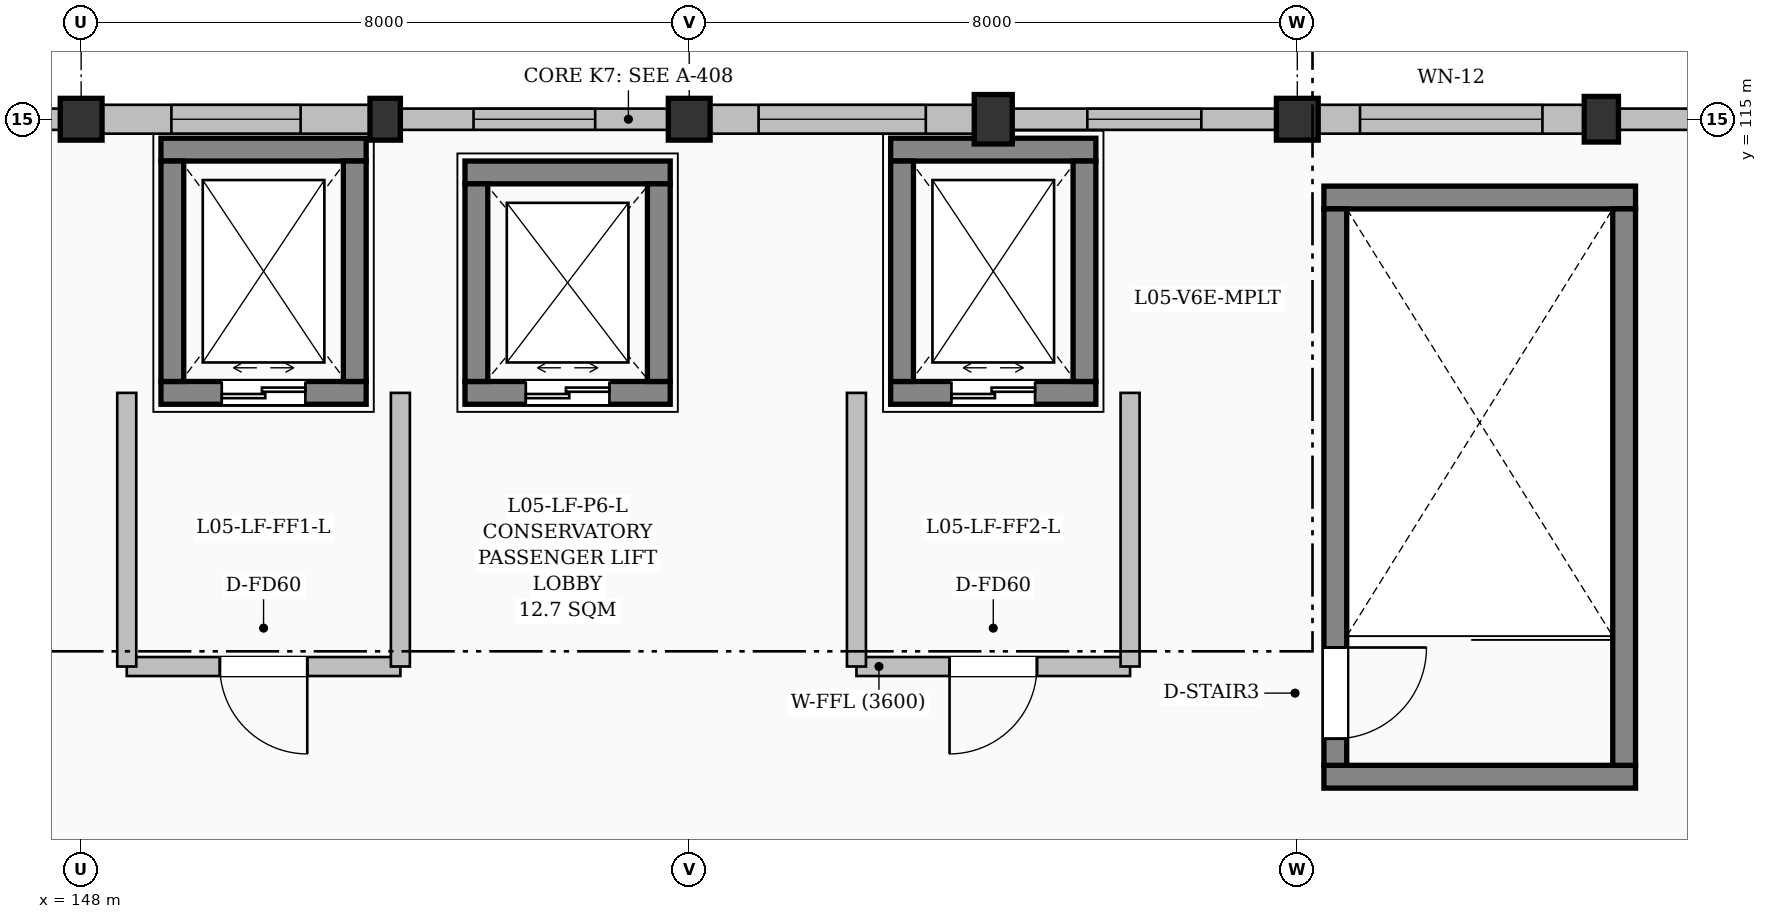
"""IFC4 building model, lengths in metres.
Left out: names, types, materials, properties, quantities, classifications, styles, units other than length and angle.
Written with IfcOpenShell. Run it as: python <this file> out.ifc"""

import sys

from ifc_helpers import new_model, si_unit, direction, frame, frame_2d, origin, origin_2d, place, context, subcontext, project, spatial, rectangle, extrude, element, fill, save


model = new_model("IFC4")
c1 = context("Model", 3, precision=1e-05, world=origin(), true_north=direction((0.0, 1.0)))
c2 = subcontext(c1, "Body", "Model", "MODEL_VIEW")
j1 = project(units=[si_unit("LENGTHUNIT", "METRE"), si_unit("PLANEANGLEUNIT", "RADIAN")], contexts=[c1])
p1 = place(None, origin())
s1 = spatial("IfcSite", under=j1, at=p1, CompositionType="ELEMENT")
p2 = place(p1, origin())
s2 = spatial("IfcBuilding", under=s1, at=p2, CompositionType="ELEMENT")
p3 = place(p2, frame((0.0, 0.0, 22.8)))
s3 = spatial("IfcBuildingStorey", under=s2, at=p3, CompositionType="ELEMENT", Elevation=22.8)
p4 = place(p3, frame((148.0, 115.0, 0.0), z_axis=(0.0, 0.0, 1.0), x_axis=(1.0, 0.0, 0.0)))
e1 = element("IfcColumn", 1, at=p4, inside=s3, PredefinedType="COLUMN", context=c2, shape_type="SweptSolid", body=[
    extrude(rectangle(XDim=0.55, YDim=0.55, at=origin_2d()), origin(), (0.0, 0.0, 1.0), 4.5),
])
p5 = place(p3, frame((152.0, 115.0, 0.0), z_axis=(0.0, 0.0, 1.0), x_axis=(1.0, 0.0, 0.0)))
e2 = element("IfcColumn", 2, at=p5, inside=s3, PredefinedType="PILASTER", context=c2, shape_type="SweptSolid", body=[
    extrude(rectangle(XDim=0.4, YDim=0.55, at=origin_2d()), origin(), (0.0, 0.0, 1.0), 4.5),
])
p6 = place(p3, frame((156.0, 115.0, 0.0), z_axis=(0.0, 0.0, 1.0), x_axis=(1.0, 0.0, 0.0)))
e3 = element("IfcColumn", 3, at=p6, inside=s3, PredefinedType="COLUMN", context=c2, shape_type="SweptSolid", body=[
    extrude(rectangle(XDim=0.55, YDim=0.55, at=origin_2d()), origin(), (0.0, 0.0, 1.0), 4.5),
])
p7 = place(p3, frame((160.0, 115.0, 0.0), z_axis=(0.0, 0.0, 1.0), x_axis=(1.0, 0.0, 0.0)))
e4 = element("IfcColumn", 4, at=p7, inside=s3, PredefinedType="PILASTER", context=c2, shape_type="SweptSolid", body=[
    extrude(rectangle(XDim=0.5, YDim=0.65, at=origin_2d()), origin(), (0.0, 0.0, 1.0), 4.5),
])
p8 = place(p3, frame((164.0, 115.0, 0.0), z_axis=(0.0, 0.0, 1.0), x_axis=(1.0, 0.0, 0.0)))
e5 = element("IfcColumn", 5, at=p8, inside=s3, PredefinedType="COLUMN", context=c2, shape_type="SweptSolid", body=[
    extrude(rectangle(XDim=0.55, YDim=0.55, at=origin_2d()), origin(), (0.0, 0.0, 1.0), 4.5),
])
p9 = place(p3, frame((168.0, 115.0, 0.0), z_axis=(0.0, 0.0, 1.0), x_axis=(1.0, 0.0, 0.0)))
e6 = element("IfcColumn", 6, at=p9, inside=s3, PredefinedType="PILASTER", context=c2, shape_type="SweptSolid", body=[
    extrude(rectangle(XDim=0.45, YDim=0.6, at=origin_2d()), origin(), (0.0, 0.0, 1.0), 4.5),
])
p10 = place(p3, frame((144.225, 115.0, 0.0), z_axis=(0.0, 0.0, 1.0), x_axis=(1.0, 0.0, 0.0)))
e7 = element("IfcWall", 7, at=p10, inside=s3, PredefinedType="SOLIDWALL", context=c2, shape_type="SweptSolid", body=[
    extrude(rectangle(XDim=3.5, YDim=0.28, at=frame_2d((1.75, 0.0))), origin(), (0.0, 0.0, 1.0), 4.125),
])
p11 = place(p10, frame((0.55, 0.0, 0.95)))
e8 = element("IfcOpeningElement", 8, at=p11, cuts=e7, PredefinedType="OPENING", context=c2, shape_type="SweptSolid", body=[
    extrude(rectangle(XDim=2.4, YDim=1.2, at=frame_2d((1.2, 0.6))), frame((0.0, 0.15, 0.0), z_axis=(0.0, -1.0, 0.0), x_axis=(1.0, 0.0, 0.0)), (0.0, 0.0, 1.0), 0.3),
])
p12 = place(p3, frame((148.275, 115.0, 0.0), z_axis=(0.0, 0.0, 1.0), x_axis=(1.0, 0.0, 0.0)))
e9 = element("IfcWall", 9, at=p12, inside=s3, PredefinedType="SOLIDWALL", context=c2, shape_type="SweptSolid", body=[
    extrude(rectangle(XDim=3.525, YDim=0.38, at=frame_2d((1.763, 0.0))), origin(), (0.0, 0.0, 1.0), 4.125),
])
p13 = place(p12, frame((0.913, 0.0, 0.95)))
e10 = element("IfcOpeningElement", 10, at=p13, cuts=e9, PredefinedType="OPENING", context=c2, shape_type="SweptSolid", body=[
    extrude(rectangle(XDim=1.7, YDim=2.0, at=frame_2d((0.85, 1.0))), frame((0.0, 0.2, 0.0), z_axis=(0.0, -1.0, 0.0), x_axis=(1.0, 0.0, 0.0)), (0.0, 0.0, 1.0), 0.4),
])
p14 = place(p3, frame((152.2, 115.0, 0.0), z_axis=(0.0, 0.0, 1.0), x_axis=(1.0, 0.0, 0.0)))
e11 = element("IfcWall", 11, at=p14, inside=s3, PredefinedType="SOLIDWALL", context=c2, shape_type="SweptSolid", body=[
    extrude(rectangle(XDim=3.525, YDim=0.28, at=frame_2d((1.763, 0.0))), origin(), (0.0, 0.0, 1.0), 4.125),
])
p15 = place(p14, frame((0.962, 0.0, 0.95)))
e12 = element("IfcOpeningElement", 12, at=p15, cuts=e11, PredefinedType="OPENING", context=c2, shape_type="SweptSolid", body=[
    extrude(rectangle(XDim=1.6, YDim=1.8, at=frame_2d((0.8, 0.9))), frame((0.0, 0.15, 0.0), z_axis=(0.0, -1.0, 0.0), x_axis=(1.0, 0.0, 0.0)), (0.0, 0.0, 1.0), 0.3),
])
p16 = place(p3, frame((156.275, 115.0, 0.0), z_axis=(0.0, 0.0, 1.0), x_axis=(1.0, 0.0, 0.0)))
e13 = element("IfcWall", 13, at=p16, inside=s3, PredefinedType="SOLIDWALL", context=c2, shape_type="SweptSolid", body=[
    extrude(rectangle(XDim=3.475, YDim=0.38, at=frame_2d((1.738, 0.0))), origin(), (0.0, 0.0, 1.0), 4.125),
])
p17 = place(p16, frame((0.637, 0.0, 0.95)))
e14 = element("IfcOpeningElement", 14, at=p17, cuts=e13, PredefinedType="OPENING", context=c2, shape_type="SweptSolid", body=[
    extrude(rectangle(XDim=2.2, YDim=1.8, at=frame_2d((1.1, 0.9))), frame((0.0, 0.2, 0.0), z_axis=(0.0, -1.0, 0.0), x_axis=(1.0, 0.0, 0.0)), (0.0, 0.0, 1.0), 0.4),
])
p18 = place(p3, frame((160.25, 115.0, 0.0), z_axis=(0.0, 0.0, 1.0), x_axis=(1.0, 0.0, 0.0)))
e15 = element("IfcWall", 15, at=p18, inside=s3, PredefinedType="SOLIDWALL", context=c2, shape_type="SweptSolid", body=[
    extrude(rectangle(XDim=3.475, YDim=0.28, at=frame_2d((1.738, 0.0))), origin(), (0.0, 0.0, 1.0), 4.125),
])
p19 = place(p18, frame((0.988, 0.0, 0.95)))
e16 = element("IfcOpeningElement", 16, at=p19, cuts=e15, PredefinedType="OPENING", context=c2, shape_type="SweptSolid", body=[
    extrude(rectangle(XDim=1.5, YDim=1.5, at=frame_2d((0.75, 0.75))), frame((0.0, 0.15, 0.0), z_axis=(0.0, -1.0, 0.0), x_axis=(1.0, 0.0, 0.0)), (0.0, 0.0, 1.0), 0.3),
])
p20 = place(p3, frame((164.275, 115.0, 0.0), z_axis=(0.0, 0.0, 1.0), x_axis=(1.0, 0.0, 0.0)))
e17 = element("IfcWall", 17, at=p20, inside=s3, PredefinedType="SOLIDWALL", context=c2, shape_type="SweptSolid", body=[
    extrude(rectangle(XDim=3.5, YDim=0.38, at=frame_2d((1.75, 0.0))), origin(), (0.0, 0.0, 1.0), 4.125),
])
p21 = place(p20, frame((0.55, 0.0, 0.95)))
e18 = element("IfcOpeningElement", 18, at=p21, cuts=e17, PredefinedType="OPENING", context=c2, shape_type="SweptSolid", body=[
    extrude(rectangle(XDim=2.4, YDim=1.5, at=frame_2d((1.2, 0.75))), frame((0.0, 0.2, 0.0), z_axis=(0.0, -1.0, 0.0), x_axis=(1.0, 0.0, 0.0)), (0.0, 0.0, 1.0), 0.4),
])
p22 = place(p3, frame((168.225, 115.0, 0.0), z_axis=(0.0, 0.0, 1.0), x_axis=(1.0, 0.0, 0.0)))
e19 = element("IfcWall", 19, at=p22, inside=s3, PredefinedType="SOLIDWALL", context=c2, shape_type="SweptSolid", body=[
    extrude(rectangle(XDim=3.5, YDim=0.28, at=frame_2d((1.75, 0.0))), origin(), (0.0, 0.0, 1.0), 4.125),
])
p23 = place(p22, frame((0.95, 0.0, 0.95)))
e20 = element("IfcOpeningElement", 20, at=p23, cuts=e19, PredefinedType="OPENING", context=c2, shape_type="SweptSolid", body=[
    extrude(rectangle(XDim=1.6, YDim=1.2, at=frame_2d((0.8, 0.6))), frame((0.0, 0.15, 0.0), z_axis=(0.0, -1.0, 0.0), x_axis=(1.0, 0.0, 0.0)), (0.0, 0.0, 1.0), 0.3),
])
for number, where, z_axis, x_axis in (
    (21, (164.35, 106.35, 0.0), (0.0, 0.0, 1.0), (1.0, 0.0, 0.0)),
    (22, (168.45, 113.97, 0.0), (0.0, 0.0, 1.0), (-1.0, 0.0, 0.0)),
):
    element("IfcWall", number, at=place(p3, frame(where, z_axis=z_axis, x_axis=x_axis)), inside=s3, PredefinedType="SHEAR", context=c2, shape_type="SweptSolid", body=[
        extrude(rectangle(XDim=4.1, YDim=0.3, at=frame_2d((2.05, 0.0))), origin(), (0.0, 0.0, 1.0), 4.25),
    ])
p24 = place(p3, frame((164.5, 113.82, 0.0), z_axis=(0.0, 0.0, 1.0), x_axis=(0.0, -1.0, 0.0)))
e23 = element("IfcWall", 23, at=p24, inside=s3, PredefinedType="SHEAR", context=c2, shape_type="SweptSolid", body=[
    extrude(rectangle(XDim=7.32, YDim=0.3, at=frame_2d((3.66, 0.0))), origin(), (0.0, 0.0, 1.0), 4.25),
])
p25 = place(p24, frame((5.77, 0.0, 0.0)))
e24 = element("IfcOpeningElement", 24, at=p25, cuts=e23, PredefinedType="OPENING", context=c2, shape_type="SweptSolid", body=[
    extrude(rectangle(XDim=1.2, YDim=2.15, at=frame_2d((0.6, 1.075))), frame((0.0, 0.16, 0.0), z_axis=(0.0, -1.0, 0.0), x_axis=(1.0, 0.0, 0.0)), (0.0, 0.0, 1.0), 0.32),
])
p26 = place(p3, frame((168.3, 113.82, 0.0), z_axis=(0.0, 0.0, 1.0), x_axis=(0.0, -1.0, 0.0)))
e25 = element("IfcWall", 25, at=p26, inside=s3, PredefinedType="SHEAR", context=c2, shape_type="SweptSolid", body=[
    extrude(rectangle(XDim=7.32, YDim=0.3, at=frame_2d((3.66, 0.0))), origin(), (0.0, 0.0, 1.0), 4.25),
])
p27 = place(p3, frame((149.05, 111.4, 0.0), z_axis=(0.0, 0.0, 1.0), x_axis=(1.0, 0.0, 0.0)))
e26 = element("IfcWall", 26, at=p27, inside=s3, PredefinedType="SHEAR", context=c2, shape_type="SweptSolid", body=[
    extrude(rectangle(XDim=2.7, YDim=0.3, at=frame_2d((1.35, 0.0))), origin(), (0.0, 0.0, 1.0), 4.25),
])
p28 = place(p27, frame((0.8, 0.0, 0.0)))
e27 = element("IfcOpeningElement", 27, at=p28, cuts=e26, PredefinedType="OPENING", context=c2, shape_type="SweptSolid", body=[
    extrude(rectangle(XDim=1.1, YDim=2.15, at=frame_2d((0.55, 1.075))), frame((0.0, 0.16, 0.0), z_axis=(0.0, -1.0, 0.0), x_axis=(1.0, 0.0, 0.0)), (0.0, 0.0, 1.0), 0.32),
])
p29 = place(p3, frame((151.75, 114.6, 0.0), z_axis=(0.0, 0.0, 1.0), x_axis=(-1.0, 0.0, 0.0)))
e28 = element("IfcWall", 28, at=p29, inside=s3, PredefinedType="SHEAR", context=c2, shape_type="SweptSolid", body=[
    extrude(rectangle(XDim=2.7, YDim=0.3, at=frame_2d((1.35, 0.0))), origin(), (0.0, 0.0, 1.0), 4.25),
])
for number, where, z_axis, x_axis in (
    (29, (149.2, 111.55, 0.0), (0.0, 0.0, 1.0), (0.0, 1.0, 0.0)),
    (30, (151.6, 114.45, 0.0), (0.0, 0.0, 1.0), (0.0, -1.0, 0.0)),
):
    element("IfcWall", number, at=place(p3, frame(where, z_axis=z_axis, x_axis=x_axis)), inside=s3, PredefinedType="SHEAR", context=c2, shape_type="SweptSolid", body=[
        extrude(rectangle(XDim=2.9, YDim=0.3, at=frame_2d((1.45, 0.0))), origin(), (0.0, 0.0, 1.0), 4.25),
    ])
p30 = place(p3, frame((152.2, 107.8, 0.0), z_axis=(0.0, 0.0, 1.0), x_axis=(-1.0, 0.0, 0.0)))
e31 = element("IfcWall", 31, at=p30, inside=s3, PredefinedType="SOLIDWALL", context=c2, shape_type="SweptSolid", body=[
    extrude(rectangle(XDim=3.6, YDim=0.25, at=frame_2d((1.8, 0.0))), origin(), (0.0, 0.0, 1.0), 4.25),
])
p31 = place(p30, frame((1.225, 0.0, 0.0)))
e32 = element("IfcOpeningElement", 32, at=p31, cuts=e31, PredefinedType="OPENING", context=c2, shape_type="SweptSolid", body=[
    extrude(rectangle(XDim=1.15, YDim=2.15, at=frame_2d((0.575, 1.075))), frame((0.0, 0.135, 0.0), z_axis=(0.0, -1.0, 0.0), x_axis=(1.0, 0.0, 0.0)), (0.0, 0.0, 1.0), 0.27),
])
for number, where, z_axis, x_axis in (
    (33, (148.6, 107.8, 0.0), (0.0, 0.0, 1.0), (0.0, 1.0, 0.0)),
    (34, (152.2, 111.4, 0.0), (0.0, 0.0, 1.0), (0.0, -1.0, 0.0)),
):
    element("IfcWall", number, at=place(p3, frame(where, z_axis=z_axis, x_axis=x_axis)), inside=s3, PredefinedType="SOLIDWALL", context=c2, shape_type="SweptSolid", body=[
        extrude(rectangle(XDim=3.6, YDim=0.25, at=frame_2d((1.8, 0.0))), origin(), (0.0, 0.0, 1.0), 4.25),
    ])
p32 = place(p3, frame((158.65, 111.4, 0.0), z_axis=(0.0, 0.0, 1.0), x_axis=(1.0, 0.0, 0.0)))
e35 = element("IfcWall", 35, at=p32, inside=s3, PredefinedType="SHEAR", context=c2, shape_type="SweptSolid", body=[
    extrude(rectangle(XDim=2.7, YDim=0.3, at=frame_2d((1.35, 0.0))), origin(), (0.0, 0.0, 1.0), 4.25),
])
p33 = place(p32, frame((0.8, 0.0, 0.0)))
e36 = element("IfcOpeningElement", 36, at=p33, cuts=e35, PredefinedType="OPENING", context=c2, shape_type="SweptSolid", body=[
    extrude(rectangle(XDim=1.1, YDim=2.15, at=frame_2d((0.55, 1.075))), frame((0.0, 0.16, 0.0), z_axis=(0.0, -1.0, 0.0), x_axis=(1.0, 0.0, 0.0)), (0.0, 0.0, 1.0), 0.32),
])
p34 = place(p3, frame((161.35, 114.6, 0.0), z_axis=(0.0, 0.0, 1.0), x_axis=(-1.0, 0.0, 0.0)))
e37 = element("IfcWall", 37, at=p34, inside=s3, PredefinedType="SHEAR", context=c2, shape_type="SweptSolid", body=[
    extrude(rectangle(XDim=2.7, YDim=0.3, at=frame_2d((1.35, 0.0))), origin(), (0.0, 0.0, 1.0), 4.25),
])
for number, where, z_axis, x_axis in (
    (38, (158.8, 111.55, 0.0), (0.0, 0.0, 1.0), (0.0, 1.0, 0.0)),
    (39, (161.2, 114.45, 0.0), (0.0, 0.0, 1.0), (0.0, -1.0, 0.0)),
):
    element("IfcWall", number, at=place(p3, frame(where, z_axis=z_axis, x_axis=x_axis)), inside=s3, PredefinedType="SHEAR", context=c2, shape_type="SweptSolid", body=[
        extrude(rectangle(XDim=2.9, YDim=0.3, at=frame_2d((1.45, 0.0))), origin(), (0.0, 0.0, 1.0), 4.25),
    ])
p35 = place(p3, frame((161.8, 107.8, 0.0), z_axis=(0.0, 0.0, 1.0), x_axis=(-1.0, 0.0, 0.0)))
e40 = element("IfcWall", 40, at=p35, inside=s3, PredefinedType="SOLIDWALL", context=c2, shape_type="SweptSolid", body=[
    extrude(rectangle(XDim=3.6, YDim=0.25, at=frame_2d((1.8, 0.0))), origin(), (0.0, 0.0, 1.0), 4.25),
])
p36 = place(p35, frame((1.225, 0.0, 0.0)))
e41 = element("IfcOpeningElement", 41, at=p36, cuts=e40, PredefinedType="OPENING", context=c2, shape_type="SweptSolid", body=[
    extrude(rectangle(XDim=1.15, YDim=2.15, at=frame_2d((0.575, 1.075))), frame((0.0, 0.135, 0.0), z_axis=(0.0, -1.0, 0.0), x_axis=(1.0, 0.0, 0.0)), (0.0, 0.0, 1.0), 0.27),
])
p37 = place(p3, frame((158.2, 107.8, 0.0), z_axis=(0.0, 0.0, 1.0), x_axis=(0.0, 1.0, 0.0)))
e42 = element("IfcWall", 42, at=p37, inside=s3, PredefinedType="SOLIDWALL", context=c2, shape_type="SweptSolid", body=[
    extrude(rectangle(XDim=3.6, YDim=0.25, at=frame_2d((1.8, 0.0))), origin(), (0.0, 0.0, 1.0), 3.974),
])
p38 = place(p3, frame((161.8, 111.4, 0.0), z_axis=(0.0, 0.0, 1.0), x_axis=(0.0, -1.0, 0.0)))
e43 = element("IfcWall", 43, at=p38, inside=s3, PredefinedType="SOLIDWALL", context=c2, shape_type="SweptSolid", body=[
    extrude(rectangle(XDim=3.6, YDim=0.25, at=frame_2d((1.8, 0.0))), origin(), (0.0, 0.0, 1.0), 4.25),
])
p39 = place(p3, frame((153.05, 111.4, 0.0), z_axis=(0.0, 0.0, 1.0), x_axis=(1.0, 0.0, 0.0)))
e44 = element("IfcWall", 44, at=p39, inside=s3, PredefinedType="SHEAR", context=c2, shape_type="SweptSolid", body=[
    extrude(rectangle(XDim=2.7, YDim=0.3, at=frame_2d((1.35, 0.0))), origin(), (0.0, 0.0, 1.0), 4.25),
])
p40 = place(p39, frame((0.8, 0.0, 0.0)))
e45 = element("IfcOpeningElement", 45, at=p40, cuts=e44, PredefinedType="OPENING", context=c2, shape_type="SweptSolid", body=[
    extrude(rectangle(XDim=1.1, YDim=2.15, at=frame_2d((0.55, 1.075))), frame((0.0, 0.16, 0.0), z_axis=(0.0, -1.0, 0.0), x_axis=(1.0, 0.0, 0.0)), (0.0, 0.0, 1.0), 0.32),
])
p41 = place(p3, frame((155.75, 114.3, 0.0), z_axis=(0.0, 0.0, 1.0), x_axis=(-1.0, 0.0, 0.0)))
e46 = element("IfcWall", 46, at=p41, inside=s3, PredefinedType="SHEAR", context=c2, shape_type="SweptSolid", body=[
    extrude(rectangle(XDim=2.7, YDim=0.3, at=frame_2d((1.35, 0.0))), origin(), (0.0, 0.0, 1.0), 4.25),
])
for number, where, z_axis, x_axis in (
    (47, (153.2, 111.55, 0.0), (0.0, 0.0, 1.0), (0.0, 1.0, 0.0)),
    (48, (155.6, 114.15, 0.0), (0.0, 0.0, 1.0), (0.0, -1.0, 0.0)),
):
    element("IfcWall", number, at=place(p3, frame(where, z_axis=z_axis, x_axis=x_axis)), inside=s3, PredefinedType="SHEAR", context=c2, shape_type="SweptSolid", body=[
        extrude(rectangle(XDim=2.6, YDim=0.3, at=frame_2d((1.3, 0.0))), origin(), (0.0, 0.0, 1.0), 4.25),
    ])
p42 = place(p13, origin())
e49 = element("IfcWindow", 49, at=p42, inside=s3, PartitioningType="DOUBLE_PANEL_VERTICAL", PredefinedType="WINDOW", context=c2, shape_type="SweptSolid", body=[
    extrude(rectangle(XDim=1.7, YDim=2.0, at=frame_2d((0.85, 1.0))), frame((0.0, 0.03, 0.0), z_axis=(0.0, -1.0, 0.0), x_axis=(1.0, 0.0, 0.0)), (0.0, 0.0, 1.0), 0.06),
])
fill(e10, e49)
p43 = place(p15, origin())
e50 = element("IfcWindow", 50, at=p43, inside=s3, PartitioningType="DOUBLE_PANEL_VERTICAL", PredefinedType="WINDOW", context=c2, shape_type="SweptSolid", body=[
    extrude(rectangle(XDim=1.6, YDim=1.8, at=frame_2d((0.8, 0.9))), frame((0.0, 0.03, 0.0), z_axis=(0.0, -1.0, 0.0), x_axis=(1.0, 0.0, 0.0)), (0.0, 0.0, 1.0), 0.06),
])
fill(e12, e50)
p44 = place(p17, origin())
e51 = element("IfcWindow", 51, at=p44, inside=s3, PartitioningType="TRIPLE_PANEL_VERTICAL", PredefinedType="WINDOW", context=c2, shape_type="SweptSolid", body=[
    extrude(rectangle(XDim=2.2, YDim=1.8, at=frame_2d((1.1, 0.9))), frame((0.0, 0.03, 0.0), z_axis=(0.0, -1.0, 0.0), x_axis=(1.0, 0.0, 0.0)), (0.0, 0.0, 1.0), 0.06),
])
fill(e14, e51)
p45 = place(p19, origin())
e52 = element("IfcWindow", 52, at=p45, inside=s3, PartitioningType="DOUBLE_PANEL_VERTICAL", PredefinedType="WINDOW", context=c2, shape_type="SweptSolid", body=[
    extrude(rectangle(XDim=1.5, YDim=1.5, at=frame_2d((0.75, 0.75))), frame((0.0, 0.03, 0.0), z_axis=(0.0, -1.0, 0.0), x_axis=(1.0, 0.0, 0.0)), (0.0, 0.0, 1.0), 0.06),
])
fill(e16, e52)
p46 = place(p21, origin())
e53 = element("IfcWindow", 53, at=p46, inside=s3, PartitioningType="TRIPLE_PANEL_VERTICAL", PredefinedType="WINDOW", context=c2, shape_type="SweptSolid", body=[
    extrude(rectangle(XDim=2.4, YDim=1.5, at=frame_2d((1.2, 0.75))), frame((0.0, 0.03, 0.0), z_axis=(0.0, -1.0, 0.0), x_axis=(1.0, 0.0, 0.0)), (0.0, 0.0, 1.0), 0.06),
])
fill(e18, e53)
p47 = place(p25, origin())
e54 = element("IfcDoor", 54, at=p47, inside=s3, OperationType="SINGLE_SWING_LEFT", PredefinedType="DOOR", context=c2, shape_type="SweptSolid", body=[
    extrude(rectangle(XDim=1.2, YDim=2.15, at=frame_2d((0.6, 1.075))), frame((0.0, 0.025, 0.0), z_axis=(0.0, -1.0, 0.0), x_axis=(1.0, 0.0, 0.0)), (0.0, 0.0, 1.0), 0.05),
])
fill(e24, e54)
p48 = place(p28, origin())
e55 = element("IfcDoor", 55, at=p48, inside=s3, OperationType="DOUBLE_DOOR_SLIDING", PredefinedType="DOOR", context=c2, shape_type="SweptSolid", body=[
    extrude(rectangle(XDim=1.1, YDim=2.15, at=frame_2d((0.55, 1.075))), frame((0.0, 0.025, 0.0), z_axis=(0.0, -1.0, 0.0), x_axis=(1.0, 0.0, 0.0)), (0.0, 0.0, 1.0), 0.05),
])
fill(e27, e55)
p49 = place(p31, origin())
e56 = element("IfcDoor", 56, at=p49, inside=s3, OperationType="SINGLE_SWING_LEFT", PredefinedType="DOOR", context=c2, shape_type="SweptSolid", body=[
    extrude(rectangle(XDim=1.15, YDim=2.15, at=frame_2d((0.575, 1.075))), frame((0.0, 0.025, 0.0), z_axis=(0.0, -1.0, 0.0), x_axis=(1.0, 0.0, 0.0)), (0.0, 0.0, 1.0), 0.05),
])
fill(e32, e56)
p50 = place(p33, origin())
e57 = element("IfcDoor", 57, at=p50, inside=s3, OperationType="DOUBLE_DOOR_SLIDING", PredefinedType="DOOR", context=c2, shape_type="SweptSolid", body=[
    extrude(rectangle(XDim=1.1, YDim=2.15, at=frame_2d((0.55, 1.075))), frame((0.0, 0.025, 0.0), z_axis=(0.0, -1.0, 0.0), x_axis=(1.0, 0.0, 0.0)), (0.0, 0.0, 1.0), 0.05),
])
fill(e36, e57)
p51 = place(p36, origin())
e58 = element("IfcDoor", 58, at=p51, inside=s3, OperationType="SINGLE_SWING_RIGHT", PredefinedType="DOOR", context=c2, shape_type="SweptSolid", body=[
    extrude(rectangle(XDim=1.15, YDim=2.15, at=frame_2d((0.575, 1.075))), frame((0.0, 0.025, 0.0), z_axis=(0.0, -1.0, 0.0), x_axis=(1.0, 0.0, 0.0)), (0.0, 0.0, 1.0), 0.05),
])
fill(e41, e58)
p52 = place(p40, origin())
e59 = element("IfcDoor", 59, at=p52, inside=s3, OperationType="DOUBLE_DOOR_SLIDING", PredefinedType="DOOR", context=c2, shape_type="SweptSolid", body=[
    extrude(rectangle(XDim=1.1, YDim=2.15, at=frame_2d((0.55, 1.075))), frame((0.0, 0.025, 0.0), z_axis=(0.0, -1.0, 0.0), x_axis=(1.0, 0.0, 0.0)), (0.0, 0.0, 1.0), 0.05),
])
fill(e45, e59)
save(model, sys.argv[1])
